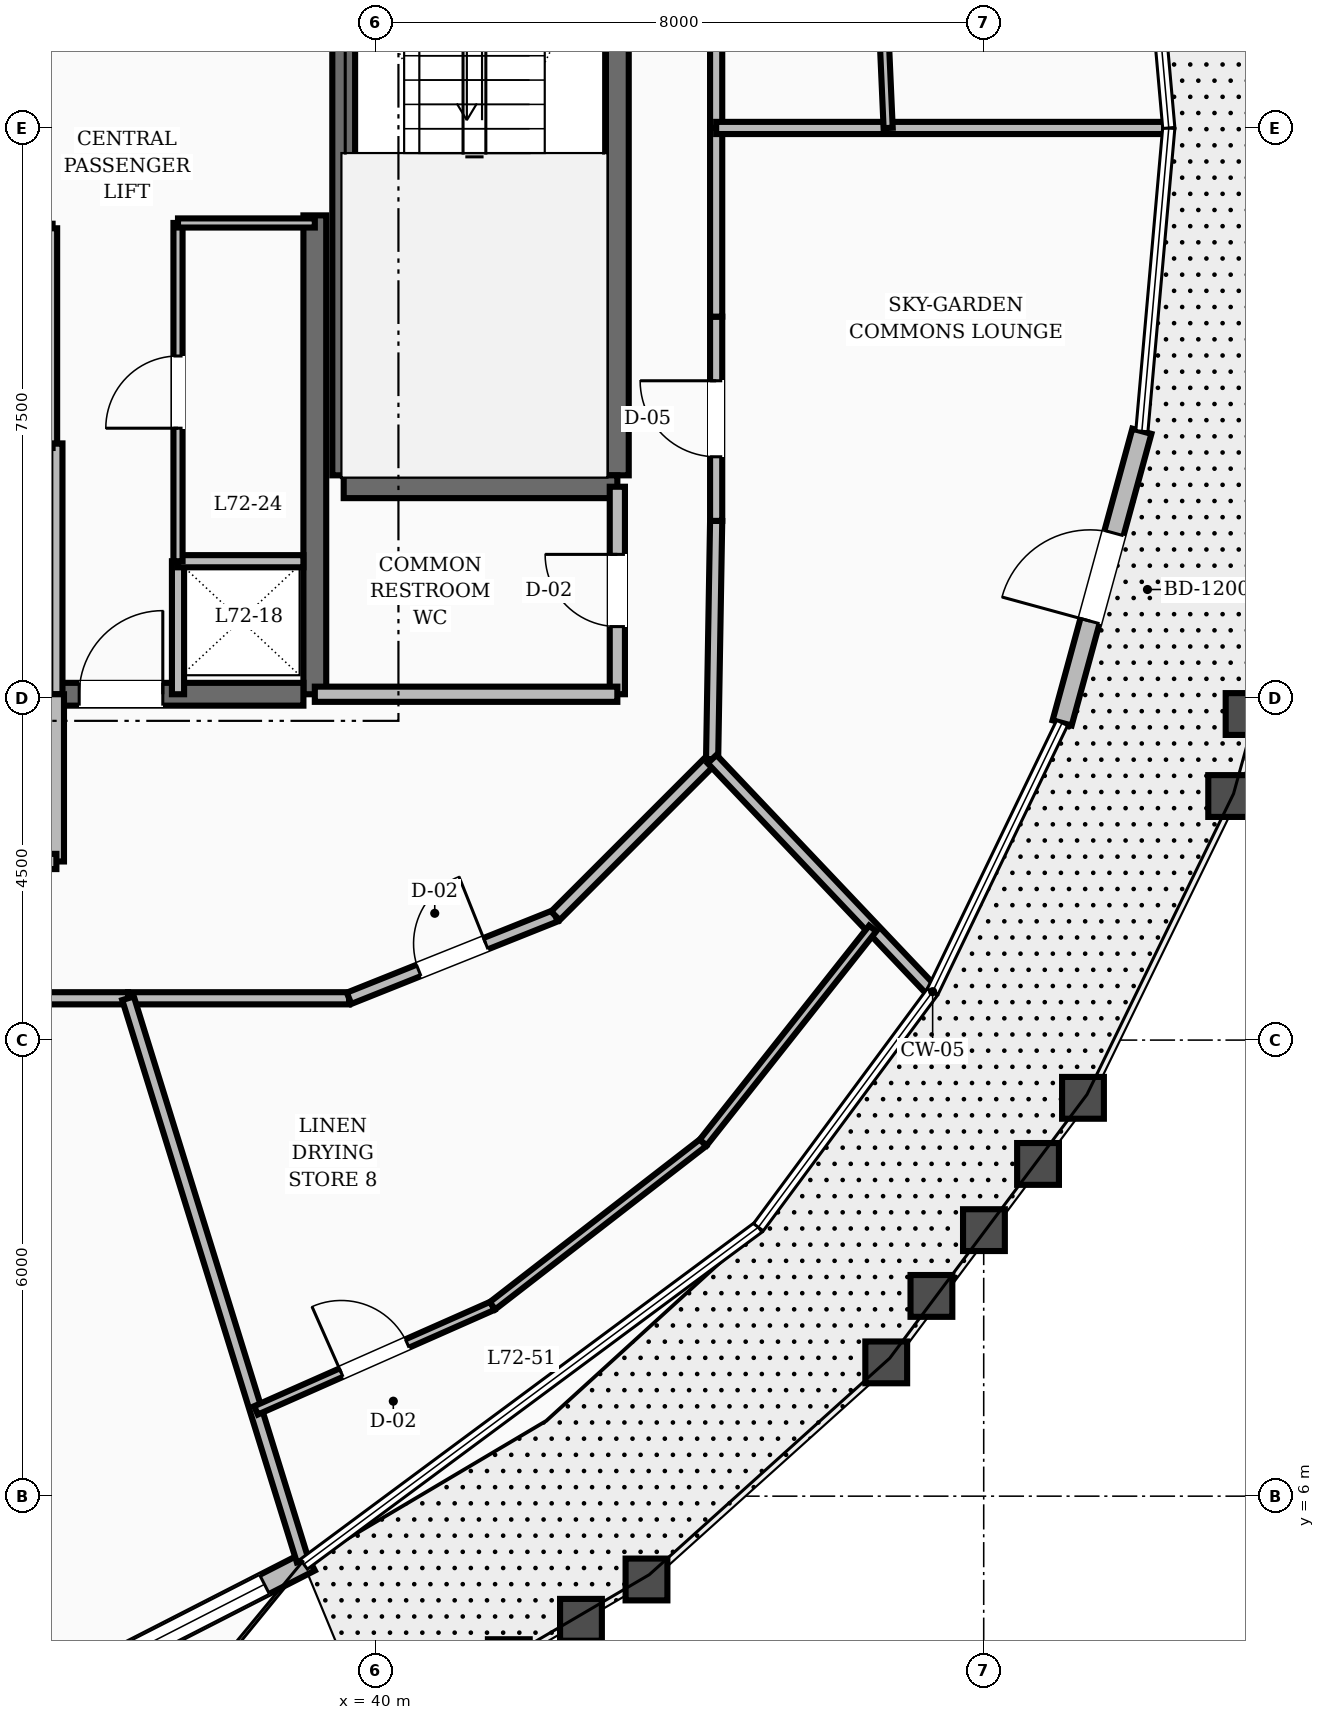
"""IFC4 building model, lengths in metres.
Left out: names, types, materials, properties, quantities, classifications, styles, units other than length and angle.
Written with IfcOpenShell. Run it as: python <this file> out.ifc"""

import sys

from ifc_helpers import new_model, si_unit, direction, frame, frame_2d, origin, place, context, subcontext, project, spatial, rectangle, extrude, element, fill, save


model = new_model("IFC4")
c1 = context("Model", 3, precision=1e-05, world=origin(), true_north=direction((0.0, 1.0)))
c2 = subcontext(c1, "Body", "Model", "MODEL_VIEW")
j1 = project(units=[si_unit("LENGTHUNIT", "METRE"), si_unit("PLANEANGLEUNIT", "RADIAN")], contexts=[c1])
p1 = place(None, origin())
s1 = spatial("IfcSite", under=j1, at=p1, CompositionType="ELEMENT")
p2 = place(p1, origin())
s2 = spatial("IfcBuilding", under=s1, at=p2, CompositionType="ELEMENT")
p3 = place(p2, frame((0.0, 0.0, 276.0)))
s3 = spatial("IfcBuildingStorey", under=s2, at=p3, CompositionType="ELEMENT", Elevation=276.0)
p4 = place(p3, frame((39.2, 16.55, 0.0), z_axis=(0.0, 0.0, 1.0), x_axis=(0.0, 1.0, 0.0)))
e1 = element("IfcWall", 1, at=p4, inside=s3, PredefinedType="SHEAR", context=c2, shape_type="SweptSolid", body=[
    extrude(rectangle(XDim=6.3, YDim=0.3, at=frame_2d((3.15, 0.0))), origin(), (0.0, 0.0, 1.0), 3.6),
])
p5 = place(p3, frame((35.8, 16.55, 0.0), z_axis=(0.0, 0.0, 1.0), x_axis=(1.0, 0.0, 0.0)))
e2 = element("IfcWall", 2, at=p5, inside=s3, PredefinedType="SHEAR", context=c2, shape_type="SweptSolid", body=[
    extrude(rectangle(XDim=3.25, YDim=0.3, at=frame_2d((1.625, 0.0))), origin(), (0.0, 0.0, 1.0), 3.6),
])
p6 = place(p5, frame((0.3, 0.0, 0.0)))
e3 = element("IfcOpeningElement", 3, at=p6, cuts=e2, PredefinedType="OPENING", context=c2, shape_type="SweptSolid", body=[
    extrude(rectangle(XDim=1.1, YDim=2.1, at=frame_2d((0.55, 1.05))), frame((0.0, 0.16, 0.0), z_axis=(0.0, -1.0, 0.0), x_axis=(1.0, 0.0, 0.0)), (0.0, 0.0, 1.0), 0.32),
])
for number, where, z_axis, x_axis in (
    (4, (43.18, 19.43, 0.0), (0.0, 0.0, 1.0), (0.0, 1.0, 0.0)),
    (5, (39.58, 19.43, 0.0), (0.0, 0.0, 1.0), (0.0, 1.0, 0.0)),
):
    element("IfcWall", number, at=place(p3, frame(where, z_axis=z_axis, x_axis=x_axis)), inside=s3, PredefinedType="SHEAR", context=c2, shape_type="SweptSolid", body=[
        extrude(rectangle(XDim=8.74, YDim=0.3, at=frame_2d((4.37, 0.0))), origin(), (0.0, 0.0, 1.0), 3.6),
    ])
p7 = place(p3, frame((39.58, 19.28, 0.0), z_axis=(0.0, 0.0, 1.0), x_axis=(1.0, 0.0, 0.0)))
e6 = element("IfcWall", 6, at=p7, inside=s3, PredefinedType="SHEAR", context=c2, shape_type="SweptSolid", body=[
    extrude(rectangle(XDim=3.6, YDim=0.3, at=frame_2d((1.8, 0.0))), origin(), (0.0, 0.0, 1.0), 3.6),
])
p8 = place(p3, frame((35.706, 3.391, 0.0), z_axis=(0.0, 0.0, 1.0), x_axis=(0.890297145605, 0.455380052843, 0.0)))
e7 = element("IfcWall", 7, at=p8, inside=s3, PredefinedType="STANDARD", context=c2, shape_type="SweptSolid", body=[
    extrude(rectangle(XDim=3.854, YDim=0.28, at=frame_2d((1.927, 0.0))), origin(), (0.0, 0.0, 1.0), 2.88),
])
p9 = place(p8, frame((0.581, 0.0, 0.8)))
e8 = element("IfcOpeningElement", 8, at=p9, cuts=e7, PredefinedType="OPENING", context=c2, shape_type="SweptSolid", body=[
    extrude(rectangle(XDim=2.6, YDim=1.65, at=frame_2d((1.3, 0.825))), frame((0.0, 0.15, 0.0), z_axis=(0.0, -1.0, 0.0), x_axis=(1.0, 0.0, 0.0)), (0.0, 0.0, 1.0), 0.3),
])
p10 = place(p3, frame((49.031, 16.173, 0.0), z_axis=(0.0, 0.0, 1.0), x_axis=(0.263792473337, 0.964579458112, 0.0)))
e9 = element("IfcWall", 9, at=p10, inside=s3, PredefinedType="STANDARD", context=c2, shape_type="SweptSolid", body=[
    extrude(rectangle(XDim=3.978, YDim=0.26, at=frame_2d((1.989, 0.0))), origin(), (0.0, 0.0, 1.0), 2.88),
])
p11 = place(p10, frame((1.389, 0.0, 0.0)))
e10 = element("IfcOpeningElement", 10, at=p11, cuts=e9, PredefinedType="OPENING", context=c2, shape_type="SweptSolid", body=[
    extrude(rectangle(XDim=1.2, YDim=2.15, at=frame_2d((0.6, 1.075))), frame((0.0, 0.14, 0.0), z_axis=(0.0, -1.0, 0.0), x_axis=(1.0, 0.0, 0.0)), (0.0, 0.0, 1.0), 0.28),
])
p12 = place(p3, frame((43.18, 16.55, 0.0), z_axis=(0.0, 0.0, 1.0), x_axis=(0.0, 1.0, 0.0)))
e11 = element("IfcWall", 11, at=p12, inside=s3, PredefinedType="SOLIDWALL", context=c2, shape_type="SweptSolid", body=[
    extrude(rectangle(XDim=2.73, YDim=0.2, at=frame_2d((1.365, 0.0))), origin(), (0.0, 0.0, 1.0), 2.87),
])
p13 = place(p12, frame((0.89, 0.0, 0.0)))
e12 = element("IfcOpeningElement", 12, at=p13, cuts=e11, PredefinedType="OPENING", context=c2, shape_type="SweptSolid", body=[
    extrude(rectangle(XDim=0.95, YDim=2.1, at=frame_2d((0.475, 1.05))), frame((0.0, 0.11, 0.0), z_axis=(0.0, -1.0, 0.0), x_axis=(1.0, 0.0, 0.0)), (0.0, 0.0, 1.0), 0.22),
])
p14 = place(p3, frame((39.2, 16.55, 0.0), z_axis=(0.0, 0.0, 1.0), x_axis=(1.0, 0.0, 0.0)))
e13 = element("IfcWall", 13, at=p14, inside=s3, PredefinedType="SOLIDWALL", context=c2, shape_type="SweptSolid", body=[
    extrude(rectangle(XDim=3.98, YDim=0.2, at=frame_2d((1.99, 0.0))), origin(), (0.0, 0.0, 1.0), 2.87),
])
p15 = place(p3, frame((35.8, 16.55, 0.0), z_axis=(0.0, 0.0, 1.0), x_axis=(0.0, 1.0, 0.0)))
e14 = element("IfcWall", 14, at=p15, inside=s3, PredefinedType="SOLIDWALL", context=c2, shape_type="SweptSolid", body=[
    extrude(rectangle(XDim=3.3, YDim=0.16, at=frame_2d((1.65, 0.0))), origin(), (0.0, 0.0, 1.0), 2.87),
])
p16 = place(p3, frame((37.4, 16.55, 0.0), z_axis=(0.0, 0.0, 1.0), x_axis=(0.0, 1.0, 0.0)))
e15 = element("IfcWall", 15, at=p16, inside=s3, PredefinedType="SOLIDWALL", context=c2, shape_type="SweptSolid", body=[
    extrude(rectangle(XDim=1.75, YDim=0.16, at=frame_2d((0.875, 0.0))), origin(), (0.0, 0.0, 1.0), 2.87),
])
p17 = place(p3, frame((35.8, 14.35, 0.0), z_axis=(0.0, 0.0, 1.0), x_axis=(0.0, 1.0, 0.0)))
e16 = element("IfcWall", 16, at=p17, inside=s3, PredefinedType="SOLIDWALL", context=c2, shape_type="SweptSolid", body=[
    extrude(rectangle(XDim=2.2, YDim=0.2, at=frame_2d((1.1, 0.0))), origin(), (0.0, 0.0, 1.0), 2.87),
])
p18 = place(p3, frame((28.2, 14.35, 0.0), z_axis=(0.0, 0.0, 1.0), x_axis=(1.0, 0.0, 0.0)))
e17 = element("IfcWall", 17, at=p18, inside=s3, PredefinedType="SOLIDWALL", context=c2, shape_type="SweptSolid", body=[
    extrude(rectangle(XDim=7.6, YDim=0.2, at=frame_2d((3.8, 0.0))), origin(), (0.0, 0.0, 1.0), 2.87),
])
p19 = place(p18, frame((3.2, 0.0, 0.0)))
e18 = element("IfcOpeningElement", 18, at=p19, cuts=e17, PredefinedType="OPENING", context=c2, shape_type="SweptSolid", body=[
    extrude(rectangle(XDim=1.2, YDim=2.1, at=frame_2d((0.6, 1.05))), frame((0.0, 0.11, 0.0), z_axis=(0.0, -1.0, 0.0), x_axis=(1.0, 0.0, 0.0)), (0.0, 0.0, 1.0), 0.22),
])
p20 = place(p3, frame((30.8, 22.68, 0.0), z_axis=(0.0, 0.0, 1.0), x_axis=(1.0, 0.0, 0.0)))
e19 = element("IfcWall", 19, at=p20, inside=s3, PredefinedType="PARTITIONING", context=c2, shape_type="SweptSolid", body=[
    extrude(rectangle(XDim=4.95, YDim=0.12, at=frame_2d((2.475, 0.0))), origin(), (0.0, 0.0, 1.0), 2.87),
])
p21 = place(p20, frame((2.0, 0.0, 0.0)))
e20 = element("IfcOpeningElement", 20, at=p21, cuts=e19, PredefinedType="OPENING", context=c2, shape_type="SweptSolid", body=[
    extrude(rectangle(XDim=0.95, YDim=2.1, at=frame_2d((0.475, 1.05))), frame((0.0, 0.07, 0.0), z_axis=(0.0, -1.0, 0.0), x_axis=(1.0, 0.0, 0.0)), (0.0, 0.0, 1.0), 0.14),
])
p22 = place(p3, frame((30.8, 19.85, 0.0), z_axis=(0.0, 0.0, 1.0), x_axis=(1.0, 0.0, 0.0)))
e21 = element("IfcWall", 21, at=p22, inside=s3, PredefinedType="PARTITIONING", context=c2, shape_type="SweptSolid", body=[
    extrude(rectangle(XDim=4.95, YDim=0.12, at=frame_2d((2.475, 0.0))), origin(), (0.0, 0.0, 1.0), 2.87),
])
p23 = place(p3, frame((35.75, 19.85, 0.0), z_axis=(0.0, 0.0, 1.0), x_axis=(0.0, 1.0, 0.0)))
e22 = element("IfcWall", 22, at=p23, inside=s3, PredefinedType="PARTITIONING", context=c2, shape_type="SweptSolid", body=[
    extrude(rectangle(XDim=2.83, YDim=0.12, at=frame_2d((1.415, 0.0))), origin(), (0.0, 0.0, 1.0), 2.87),
])
p24 = place(p3, frame((37.4, 18.3, 0.0), z_axis=(0.0, 0.0, 1.0), x_axis=(1.0, 0.0, 0.0)))
e23 = element("IfcWall", 23, at=p24, inside=s3, PredefinedType="SOLIDWALL", context=c2, shape_type="SweptSolid", body=[
    extrude(rectangle(XDim=1.65, YDim=0.16, at=frame_2d((0.825, 0.0))), origin(), (0.0, 0.0, 1.0), 2.87),
])
p25 = place(p3, frame((37.4, 18.3, 0.0), z_axis=(0.0, 0.0, 1.0), x_axis=(0.0, 1.0, 0.0)))
e24 = element("IfcWall", 24, at=p25, inside=s3, PredefinedType="PARTITIONING", context=c2, shape_type="SweptSolid", body=[
    extrude(rectangle(XDim=4.45, YDim=0.12, at=frame_2d((2.225, 0.0))), origin(), (0.0, 0.0, 1.0), 2.87),
])
p26 = place(p25, frame((1.75, 0.0, 0.0)))
e25 = element("IfcOpeningElement", 25, at=p26, cuts=e24, PredefinedType="OPENING", context=c2, shape_type="SweptSolid", body=[
    extrude(rectangle(XDim=0.95, YDim=2.1, at=frame_2d((0.475, 1.05))), frame((0.0, 0.07, 0.0), z_axis=(0.0, -1.0, 0.0), x_axis=(1.0, 0.0, 0.0)), (0.0, 0.0, 1.0), 0.14),
])
p27 = place(p3, frame((37.4, 22.75, 0.0), z_axis=(0.0, 0.0, 1.0), x_axis=(1.0, 0.0, 0.0)))
e26 = element("IfcWall", 26, at=p27, inside=s3, PredefinedType="PARTITIONING", context=c2, shape_type="SweptSolid", body=[
    extrude(rectangle(XDim=1.8, YDim=0.12, at=frame_2d((0.9, 0.0))), origin(), (0.0, 0.0, 1.0), 2.87),
])
p28 = place(p3, frame((44.48, 24.0, 0.0), z_axis=(0.0, 0.0, 1.0), x_axis=(0.0, 1.0, 0.0)))
e27 = element("IfcWall", 27, at=p28, inside=s3, PredefinedType="SOLIDWALL", context=c2, shape_type="SweptSolid", body=[
    extrude(rectangle(XDim=2.482, YDim=0.16, at=frame_2d((1.241, 0.0))), origin(), (0.0, 0.0, 1.0), 2.87),
])
p29 = place(p3, frame((34.278, 12.55, 0.0), z_axis=(0.0, 0.0, 1.0), x_axis=(1.0, 0.0, 0.0)))
e28 = element("IfcWall", 28, at=p29, inside=s3, PredefinedType="SOLIDWALL", context=c2, shape_type="SweptSolid", body=[
    extrude(rectangle(XDim=2.465, YDim=0.16, at=frame_2d((1.232, 0.0))), origin(), (0.0, 0.0, 1.0), 2.87),
])
p30 = place(p3, frame((36.743, 12.55, 0.0), z_axis=(0.0, 0.0, 1.0), x_axis=(1.0, 0.0, 0.0)))
e29 = element("IfcWall", 29, at=p30, inside=s3, PredefinedType="SOLIDWALL", context=c2, shape_type="SweptSolid", body=[
    extrude(rectangle(XDim=2.908, YDim=0.16, at=frame_2d((1.454, 0.0))), origin(), (0.0, 0.0, 1.0), 2.87),
])
p31 = place(p3, frame((39.651, 12.55, 0.0), z_axis=(0.0, 0.0, 1.0), x_axis=(0.92856882165, 0.371160266542, 0.0)))
e30 = element("IfcWall", 30, at=p31, inside=s3, PredefinedType="SOLIDWALL", context=c2, shape_type="SweptSolid", body=[
    extrude(rectangle(XDim=2.923, YDim=0.16, at=frame_2d((1.461, 0.0))), origin(), (0.0, 0.0, 1.0), 2.87),
])
p32 = place(p31, frame((0.987, 0.0, 0.0)))
e31 = element("IfcOpeningElement", 31, at=p32, cuts=e30, PredefinedType="OPENING", context=c2, shape_type="SweptSolid", body=[
    extrude(rectangle(XDim=0.95, YDim=2.1, at=frame_2d((0.475, 1.05))), frame((0.0, 0.09, 0.0), z_axis=(0.0, -1.0, 0.0), x_axis=(1.0, 0.0, 0.0)), (0.0, 0.0, 1.0), 0.18),
])
p33 = place(p3, frame((42.365, 13.635, 0.0), z_axis=(0.0, 0.0, 1.0), x_axis=(0.707106781187, 0.707106781187, 0.0)))
e32 = element("IfcWall", 32, at=p33, inside=s3, PredefinedType="SOLIDWALL", context=c2, shape_type="SweptSolid", body=[
    extrude(rectangle(XDim=2.916, YDim=0.16, at=frame_2d((1.458, 0.0))), origin(), (0.0, 0.0, 1.0), 2.87),
])
p34 = place(p3, frame((44.427, 15.697, 0.0), z_axis=(0.0, 0.0, 1.0), x_axis=(0.016981035134, 0.999855811828, 0.0)))
e33 = element("IfcWall", 33, at=p34, inside=s3, PredefinedType="SOLIDWALL", context=c2, shape_type="SweptSolid", body=[
    extrude(rectangle(XDim=3.134, YDim=0.16, at=frame_2d((1.567, 0.0))), origin(), (0.0, 0.0, 1.0), 2.87),
])
p35 = place(p3, frame((44.48, 18.831, 0.0), z_axis=(0.0, 0.0, 1.0), x_axis=(0.0, 1.0, 0.0)))
e34 = element("IfcWall", 34, at=p35, inside=s3, PredefinedType="SOLIDWALL", context=c2, shape_type="SweptSolid", body=[
    extrude(rectangle(XDim=2.687, YDim=0.16, at=frame_2d((1.344, 0.0))), origin(), (0.0, 0.0, 1.0), 2.87),
])
p36 = place(p35, frame((0.844, 0.0, 0.0)))
e35 = element("IfcOpeningElement", 35, at=p36, cuts=e34, PredefinedType="OPENING", context=c2, shape_type="SweptSolid", body=[
    extrude(rectangle(XDim=1.0, YDim=2.1, at=frame_2d((0.5, 1.05))), frame((0.0, 0.09, 0.0), z_axis=(0.0, -1.0, 0.0), x_axis=(1.0, 0.0, 0.0)), (0.0, 0.0, 1.0), 0.18),
])
p37 = place(p3, frame((44.48, 21.518, 0.0), z_axis=(0.0, 0.0, 1.0), x_axis=(0.0, 1.0, 0.0)))
e36 = element("IfcWall", 36, at=p37, inside=s3, PredefinedType="SOLIDWALL", context=c2, shape_type="SweptSolid", body=[
    extrude(rectangle(XDim=2.482, YDim=0.16, at=frame_2d((1.241, 0.0))), origin(), (0.0, 0.0, 1.0), 2.87),
])
p38 = place(p3, frame((44.427, 15.697, 0.0), z_axis=(0.0, 0.0, 1.0), x_axis=(0.688077752734, -0.72563696584, 0.0)))
e37 = element("IfcWall", 37, at=p38, inside=s3, PredefinedType="SOLIDWALL", context=c2, shape_type="SweptSolid", body=[
    extrude(rectangle(XDim=4.167, YDim=0.16, at=frame_2d((2.083, 0.0))), origin(), (0.0, 0.0, 1.0), 2.87),
])
p39 = place(p3, frame((44.48, 24.0, 0.0), z_axis=(0.0, 0.0, 1.0), x_axis=(1.0, 0.0, 0.0)))
e38 = element("IfcWall", 38, at=p39, inside=s3, PredefinedType="SOLIDWALL", context=c2, shape_type="SweptSolid", body=[
    extrude(rectangle(XDim=5.905, YDim=0.16, at=frame_2d((2.953, 0.0))), origin(), (0.0, 0.0, 1.0), 2.87),
])
p40 = place(p3, frame((46.743, 24.0, 0.0), z_axis=(0.0, 0.0, 1.0), x_axis=(-0.043984558391, 0.999032211004, 0.0)))
e39 = element("IfcWall", 39, at=p40, inside=s3, PredefinedType="PARTITIONING", context=c2, shape_type="SweptSolid", body=[
    extrude(rectangle(XDim=3.058, YDim=0.12, at=frame_2d((1.529, 0.0))), origin(), (0.0, 0.0, 1.0), 2.87),
])
p41 = place(p40, frame((1.099, 0.0, 0.0)))
e40 = element("IfcOpeningElement", 40, at=p41, cuts=e39, PredefinedType="OPENING", context=c2, shape_type="SweptSolid", body=[
    extrude(rectangle(XDim=0.86, YDim=2.1, at=frame_2d((0.43, 1.05))), frame((0.0, 0.07, 0.0), z_axis=(0.0, -1.0, 0.0), x_axis=(1.0, 0.0, 0.0)), (0.0, 0.0, 1.0), 0.14),
])
p42 = place(p3, frame((36.743, 12.55, 0.0), z_axis=(0.0, 0.0, 1.0), x_axis=(0.296540968553, -0.955020132756, 0.0)))
e41 = element("IfcWall", 41, at=p42, inside=s3, PredefinedType="SOLIDWALL", context=c2, shape_type="SweptSolid", body=[
    extrude(rectangle(XDim=7.746, YDim=0.16, at=frame_2d((3.873, 0.0))), origin(), (0.0, 0.0, 1.0), 2.87),
])
p43 = place(p3, frame((38.426, 7.128, 0.0), z_axis=(0.0, 0.0, 1.0), x_axis=(0.914529211397, 0.404519865399, 0.0)))
e42 = element("IfcWall", 42, at=p43, inside=s3, PredefinedType="PARTITIONING", context=c2, shape_type="SweptSolid", body=[
    extrude(rectangle(XDim=3.402, YDim=0.12, at=frame_2d((1.701, 0.0))), origin(), (0.0, 0.0, 1.0), 2.87),
])
p44 = place(p43, frame((1.226, 0.0, 0.0)))
e43 = element("IfcOpeningElement", 43, at=p44, cuts=e42, PredefinedType="OPENING", context=c2, shape_type="SweptSolid", body=[
    extrude(rectangle(XDim=0.95, YDim=2.1, at=frame_2d((0.475, 1.05))), frame((0.0, 0.07, 0.0), z_axis=(0.0, -1.0, 0.0), x_axis=(1.0, 0.0, 0.0)), (0.0, 0.0, 1.0), 0.14),
])
p45 = place(p3, frame((41.537, 8.505, 0.0), z_axis=(0.0, 0.0, 1.0), x_axis=(0.790595390805, 0.61233889966, 0.0)))
e44 = element("IfcWall", 44, at=p45, inside=s3, PredefinedType="PARTITIONING", context=c2, shape_type="SweptSolid", body=[
    extrude(rectangle(XDim=3.506, YDim=0.12, at=frame_2d((1.753, 0.0))), origin(), (0.0, 0.0, 1.0), 2.87),
])
p46 = place(p3, frame((44.309, 10.652, 0.0), z_axis=(0.0, 0.0, 1.0), x_axis=(0.620626365253, 0.78410644351, 0.0)))
e45 = element("IfcWall", 45, at=p46, inside=s3, PredefinedType="PARTITIONING", context=c2, shape_type="SweptSolid", body=[
    extrude(rectangle(XDim=3.593, YDim=0.12, at=frame_2d((1.796, 0.0))), origin(), (0.0, 0.0, 1.0), 2.87),
])
p47 = place(p9, origin())
e46 = element("IfcWindow", 46, at=p47, inside=s3, PartitioningType="SINGLE_PANEL", PredefinedType="WINDOW", context=c2, shape_type="SweptSolid", body=[
    extrude(rectangle(XDim=2.6, YDim=1.65, at=frame_2d((1.3, 0.825))), frame((0.0, 0.03, 0.0), z_axis=(0.0, -1.0, 0.0), x_axis=(1.0, 0.0, 0.0)), (0.0, 0.0, 1.0), 0.06),
])
fill(e8, e46)
p48 = place(p11, origin())
e47 = element("IfcDoor", 47, at=p48, inside=s3, OperationType="SINGLE_SWING_LEFT", PredefinedType="DOOR", context=c2, shape_type="SweptSolid", body=[
    extrude(rectangle(XDim=1.2, YDim=2.15, at=frame_2d((0.6, 1.075))), frame((0.0, 0.025, 0.0), z_axis=(0.0, -1.0, 0.0), x_axis=(1.0, 0.0, 0.0)), (0.0, 0.0, 1.0), 0.05),
])
fill(e10, e47)
p49 = place(p13, origin())
e48 = element("IfcDoor", 48, at=p49, inside=s3, OperationType="SINGLE_SWING_RIGHT", PredefinedType="DOOR", context=c2, shape_type="SweptSolid", body=[
    extrude(rectangle(XDim=0.95, YDim=2.1, at=frame_2d((0.475, 1.05))), frame((0.0, 0.025, 0.0), z_axis=(0.0, -1.0, 0.0), x_axis=(1.0, 0.0, 0.0)), (0.0, 0.0, 1.0), 0.05),
])
fill(e12, e48)
p50 = place(p6, origin())
e49 = element("IfcDoor", 49, at=p50, inside=s3, OperationType="SINGLE_SWING_RIGHT", PredefinedType="DOOR", context=c2, shape_type="SweptSolid", body=[
    extrude(rectangle(XDim=1.1, YDim=2.1, at=frame_2d((0.55, 1.05))), frame((0.0, 0.025, 0.0), z_axis=(0.0, -1.0, 0.0), x_axis=(1.0, 0.0, 0.0)), (0.0, 0.0, 1.0), 0.05),
])
fill(e3, e49)
p51 = place(p26, origin())
e50 = element("IfcDoor", 50, at=p51, inside=s3, OperationType="SINGLE_SWING_LEFT", PredefinedType="DOOR", context=c2, shape_type="SweptSolid", body=[
    extrude(rectangle(XDim=0.95, YDim=2.1, at=frame_2d((0.475, 1.05))), frame((0.0, 0.025, 0.0), z_axis=(0.0, -1.0, 0.0), x_axis=(1.0, 0.0, 0.0)), (0.0, 0.0, 1.0), 0.05),
])
fill(e25, e50)
p52 = place(p36, origin())
e51 = element("IfcDoor", 51, at=p52, inside=s3, OperationType="SINGLE_SWING_RIGHT", PredefinedType="DOOR", context=c2, shape_type="SweptSolid", body=[
    extrude(rectangle(XDim=1.0, YDim=2.1, at=frame_2d((0.5, 1.05))), frame((0.0, 0.025, 0.0), z_axis=(0.0, -1.0, 0.0), x_axis=(1.0, 0.0, 0.0)), (0.0, 0.0, 1.0), 0.05),
])
fill(e35, e51)
p53 = place(p32, origin())
e52 = element("IfcDoor", 52, at=p53, inside=s3, OperationType="SINGLE_SWING_RIGHT", PredefinedType="DOOR", context=c2, shape_type="SweptSolid", body=[
    extrude(rectangle(XDim=0.95, YDim=2.1, at=frame_2d((0.475, 1.05))), frame((0.0, 0.025, 0.0), z_axis=(0.0, -1.0, 0.0), x_axis=(1.0, 0.0, 0.0)), (0.0, 0.0, 1.0), 0.05),
])
fill(e31, e52)
p54 = place(p44, origin())
e53 = element("IfcDoor", 53, at=p54, inside=s3, OperationType="SINGLE_SWING_LEFT", PredefinedType="DOOR", context=c2, shape_type="SweptSolid", body=[
    extrude(rectangle(XDim=0.95, YDim=2.1, at=frame_2d((0.475, 1.05))), frame((0.0, 0.025, 0.0), z_axis=(0.0, -1.0, 0.0), x_axis=(1.0, 0.0, 0.0)), (0.0, 0.0, 1.0), 0.05),
])
fill(e43, e53)
save(model, sys.argv[1])
